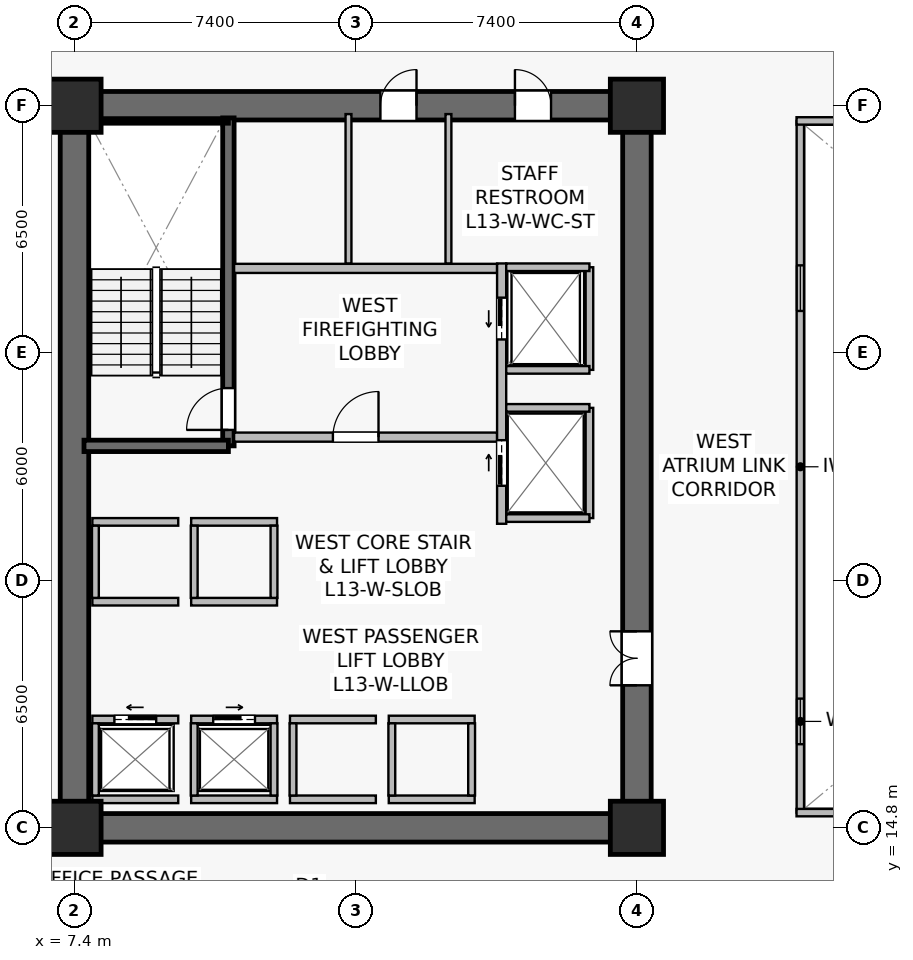
"""IFC4 building model, lengths in metres.
Left out: names, types, materials, properties, quantities, classifications, styles, units other than length and angle.
Written with IfcOpenShell. Run it as: python <this file> out.ifc"""

import sys

from ifc_helpers import new_model, si_unit, direction, frame, frame_2d, origin, origin_2d, place, context, subcontext, project, spatial, rectangle, extrude, source, transform, mapped, element, fill, save


model = new_model("IFC4")
c1 = context("Model", 3, precision=1e-05, world=origin(), true_north=direction((0.0, 1.0)))
c2 = subcontext(c1, "Body", "Model", "MODEL_VIEW")
j1 = project(units=[si_unit("LENGTHUNIT", "METRE"), si_unit("PLANEANGLEUNIT", "RADIAN")], contexts=[c1])
p1 = place(None, origin())
s1 = spatial("IfcSite", under=j1, at=p1, CompositionType="ELEMENT")
p2 = place(p1, origin())
s2 = spatial("IfcBuilding", under=s1, at=p2, CompositionType="ELEMENT")
p3 = place(p2, frame((0.0, 0.0, 53.9)))
s3 = spatial("IfcBuildingStorey", under=s2, at=p3, CompositionType="ELEMENT", Elevation=53.9)
p4 = place(p3, frame((7.025, 14.8, 0.0), z_axis=(0.0, 0.0, 1.0), x_axis=(1.0, 0.0, 0.0)))
e1 = element("IfcWall", 1, at=p4, inside=s3, PredefinedType="SHEAR", context=c2, shape_type="SweptSolid", body=[
    extrude(rectangle(XDim=15.55, YDim=0.75, at=frame_2d((7.775, 0.0))), origin(), (0.0, 0.0, 1.0), 3.78),
])
p5 = place(p3, frame((7.025, 33.8, 0.0), z_axis=(0.0, 0.0, 1.0), x_axis=(1.0, 0.0, 0.0)))
e2 = element("IfcWall", 2, at=p5, inside=s3, PredefinedType="SHEAR", context=c2, shape_type="SweptSolid", body=[
    extrude(rectangle(XDim=15.55, YDim=0.75, at=frame_2d((7.775, 0.0))), origin(), (0.0, 0.0, 1.0), 3.78),
])
p6 = place(p5, frame((8.425, 0.0, 0.0)))
e3 = element("IfcOpeningElement", 3, at=p6, cuts=e2, PredefinedType="OPENING", context=c2, shape_type="SweptSolid", body=[
    extrude(rectangle(XDim=0.95, YDim=2.15, at=frame_2d((0.475, 1.075))), frame((0.0, 0.385, 0.0), z_axis=(0.0, -1.0, 0.0), x_axis=(1.0, 0.0, 0.0)), (0.0, 0.0, 1.0), 0.77),
])
p7 = place(p5, frame((11.965, 0.0, 0.0)))
e4 = element("IfcOpeningElement", 4, at=p7, cuts=e2, PredefinedType="OPENING", context=c2, shape_type="SweptSolid", body=[
    extrude(rectangle(XDim=0.95, YDim=2.15, at=frame_2d((0.475, 1.075))), frame((0.0, 0.385, 0.0), z_axis=(0.0, -1.0, 0.0), x_axis=(1.0, 0.0, 0.0)), (0.0, 0.0, 1.0), 0.77),
])
p8 = place(p3, frame((7.4, 15.175, 0.0), z_axis=(0.0, 0.0, 1.0), x_axis=(0.0, 1.0, 0.0)))
e5 = element("IfcWall", 5, at=p8, inside=s3, PredefinedType="SHEAR", context=c2, shape_type="SweptSolid", body=[
    extrude(rectangle(XDim=18.25, YDim=0.75, at=frame_2d((9.125, 0.0))), origin(), (0.0, 0.0, 1.0), 3.78),
])
p9 = place(p3, frame((22.2, 15.175, 0.0), z_axis=(0.0, 0.0, 1.0), x_axis=(0.0, 1.0, 0.0)))
e6 = element("IfcWall", 6, at=p9, inside=s3, PredefinedType="SHEAR", context=c2, shape_type="SweptSolid", body=[
    extrude(rectangle(XDim=18.25, YDim=0.75, at=frame_2d((9.125, 0.0))), origin(), (0.0, 0.0, 1.0), 3.78),
])
p10 = place(p9, frame((3.375, 0.0, 0.0)))
e7 = element("IfcOpeningElement", 7, at=p10, cuts=e6, PredefinedType="OPENING", context=c2, shape_type="SweptSolid", body=[
    extrude(rectangle(XDim=1.42, YDim=2.2, at=frame_2d((0.71, 1.1))), frame((0.0, 0.385, 0.0), z_axis=(0.0, -1.0, 0.0), x_axis=(1.0, 0.0, 0.0)), (0.0, 0.0, 1.0), 0.77),
])
p11 = place(p3, frame((11.45, 24.85, 0.0), z_axis=(0.0, 0.0, 1.0), x_axis=(0.0, 1.0, 0.0)))
e8 = element("IfcWall", 8, at=p11, inside=s3, PredefinedType="SHEAR", context=c2, shape_type="SweptSolid", body=[
    extrude(rectangle(XDim=8.63, YDim=0.3, at=frame_2d((4.315, 0.0))), origin(), (0.0, 0.0, 1.0), 3.78),
])
p12 = place(p11, frame((0.42, 0.0, 0.0)))
e9 = element("IfcOpeningElement", 9, at=p12, cuts=e8, PredefinedType="OPENING", context=c2, shape_type="SweptSolid", body=[
    extrude(rectangle(XDim=1.1, YDim=2.15, at=frame_2d((0.55, 1.075))), frame((0.0, 0.16, 0.0), z_axis=(0.0, -1.0, 0.0), x_axis=(1.0, 0.0, 0.0)), (0.0, 0.0, 1.0), 0.32),
])
p13 = place(p3, frame((7.65, 24.85, 0.0), z_axis=(0.0, 0.0, 1.0), x_axis=(1.0, 0.0, 0.0)))
e10 = element("IfcWall", 10, at=p13, inside=s3, PredefinedType="SHEAR", context=c2, shape_type="SweptSolid", body=[
    extrude(rectangle(XDim=3.8, YDim=0.3, at=frame_2d((1.9, 0.0))), origin(), (0.0, 0.0, 1.0), 3.78),
])
p14 = place(p3, frame((7.73, 33.4, 0.0), z_axis=(0.0, 0.0, 1.0), x_axis=(1.0, 0.0, 0.0)))
e11 = element("IfcWall", 11, at=p14, inside=s3, PredefinedType="SOLIDWALL", context=c2, shape_type="SweptSolid", body=[
    extrude(rectangle(XDim=3.72, YDim=0.12, at=frame_2d((1.86, 0.0))), origin(), (0.0, 0.0, 1.0), 3.78),
])
m1 = source(origin(), c2, "Body", "SweptSolid", [
    extrude(rectangle(XDim=1.4, YDim=1.4, at=origin_2d()), origin(), (0.0, 0.0, 1.0), 4.1),
])
for number, where, z_axis, x_axis in (
    (12, (7.4, 14.8, 0.0), (0.0, 0.0, 1.0), (1.0, 0.0, 0.0)),
    (13, (22.2, 14.8, 0.0), (0.0, 0.0, 1.0), (1.0, 0.0, 0.0)),
    (14, (7.4, 33.8, 0.0), (0.0, 0.0, 1.0), (1.0, 0.0, 0.0)),
    (15, (22.2, 33.8, 0.0), (0.0, 0.0, 1.0), (1.0, 0.0, 0.0)),
):
    element("IfcColumn", number, at=place(p3, frame(where, z_axis=z_axis, x_axis=x_axis)), inside=s3, PredefinedType="COLUMN", context=c2, shape_type="MappedRepresentation", body=[
        mapped(m1, transform((0.0, 0.0, 0.0), scale=1.0)),
    ])
p15 = place(p3, frame((11.6, 25.08, 0.0), z_axis=(0.0, 0.0, 1.0), x_axis=(1.0, 0.0, 0.0)))
e16 = element("IfcWall", 16, at=p15, inside=s3, PredefinedType="SOLIDWALL", context=c2, shape_type="SweptSolid", body=[
    extrude(rectangle(XDim=6.92, YDim=0.24, at=frame_2d((3.46, 0.0))), origin(), (0.0, 0.0, 1.0), 3.065),
])
p16 = place(p15, frame((2.6, 0.0, 0.0)))
e17 = element("IfcOpeningElement", 17, at=p16, cuts=e16, PredefinedType="OPENING", context=c2, shape_type="SweptSolid", body=[
    extrude(rectangle(XDim=1.2, YDim=2.16, at=frame_2d((0.6, 1.08))), frame((0.0, 0.13, 0.0), z_axis=(0.0, -1.0, 0.0), x_axis=(1.0, 0.0, 0.0)), (0.0, 0.0, 1.0), 0.26),
])
p17 = place(p3, frame((11.6, 29.52, 0.0), z_axis=(0.0, 0.0, 1.0), x_axis=(1.0, 0.0, 0.0)))
e18 = element("IfcWall", 18, at=p17, inside=s3, PredefinedType="SOLIDWALL", context=c2, shape_type="SweptSolid", body=[
    extrude(rectangle(XDim=6.92, YDim=0.24, at=frame_2d((3.46, 0.0))), origin(), (0.0, 0.0, 1.0), 3.065),
])
p18 = place(p3, frame((18.64, 22.8, 0.0), z_axis=(0.0, 0.0, 1.0), x_axis=(0.0, 1.0, 0.0)))
e19 = element("IfcWall", 19, at=p18, inside=s3, PredefinedType="SOLIDWALL", context=c2, shape_type="SweptSolid", body=[
    extrude(rectangle(XDim=6.85, YDim=0.24, at=frame_2d((3.425, 0.0))), origin(), (0.0, 0.0, 1.0), 2.865),
])
p19 = place(p18, frame((4.85, 0.0, 0.0)))
e20 = element("IfcOpeningElement", 20, at=p19, cuts=e19, PredefinedType="OPENING", context=c2, shape_type="SweptSolid", body=[
    extrude(rectangle(XDim=1.1, YDim=2.22, at=frame_2d((0.55, 1.11))), frame((0.0, 0.13, 0.0), z_axis=(0.0, -1.0, 0.0), x_axis=(1.0, 0.0, 0.0)), (0.0, 0.0, 1.0), 0.26),
])
p20 = place(p18, frame((1.0, 0.0, 0.0)))
e21 = element("IfcOpeningElement", 21, at=p20, cuts=e19, PredefinedType="OPENING", context=c2, shape_type="SweptSolid", body=[
    extrude(rectangle(XDim=1.2, YDim=2.22, at=frame_2d((0.6, 1.11))), frame((0.0, 0.13, 0.0), z_axis=(0.0, -1.0, 0.0), x_axis=(1.0, 0.0, 0.0)), (0.0, 0.0, 1.0), 0.26),
])
p21 = place(p3, frame((7.87, 17.65, 0.0), z_axis=(0.0, 0.0, 1.0), x_axis=(1.0, 0.0, 0.0)))
e22 = element("IfcWall", 22, at=p21, inside=s3, PredefinedType="SOLIDWALL", context=c2, shape_type="SweptSolid", body=[
    extrude(rectangle(XDim=2.26, YDim=0.2, at=frame_2d((1.13, 0.0))), origin(), (0.0, 0.0, 1.0), 3.78),
])
p22 = place(p21, frame((0.58, 0.0, 0.0)))
e23 = element("IfcOpeningElement", 23, at=p22, cuts=e22, PredefinedType="OPENING", context=c2, shape_type="SweptSolid", body=[
    extrude(rectangle(XDim=1.1, YDim=2.22, at=frame_2d((0.55, 1.11))), frame((0.0, 0.11, 0.0), z_axis=(0.0, -1.0, 0.0), x_axis=(1.0, 0.0, 0.0)), (0.0, 0.0, 1.0), 0.22),
])
p23 = place(p3, frame((7.87, 15.55, 0.0), z_axis=(0.0, 0.0, 1.0), x_axis=(1.0, 0.0, 0.0)))
e24 = element("IfcWall", 24, at=p23, inside=s3, PredefinedType="SOLIDWALL", context=c2, shape_type="SweptSolid", body=[
    extrude(rectangle(XDim=2.26, YDim=0.2, at=frame_2d((1.13, 0.0))), origin(), (0.0, 0.0, 1.0), 3.78),
])
p24 = place(p3, frame((7.95, 15.65, 0.0), z_axis=(0.0, 0.0, 1.0), x_axis=(0.0, 1.0, 0.0)))
e25 = element("IfcWall", 25, at=p24, inside=s3, PredefinedType="SOLIDWALL", context=c2, shape_type="SweptSolid", body=[
    extrude(rectangle(XDim=1.9, YDim=0.18, at=frame_2d((0.95, 0.0))), origin(), (0.0, 0.0, 1.0), 3.78),
])
p25 = place(p3, frame((10.47, 17.65, 0.0), z_axis=(0.0, 0.0, 1.0), x_axis=(1.0, 0.0, 0.0)))
e26 = element("IfcWall", 26, at=p25, inside=s3, PredefinedType="SOLIDWALL", context=c2, shape_type="SweptSolid", body=[
    extrude(rectangle(XDim=2.26, YDim=0.2, at=frame_2d((1.13, 0.0))), origin(), (0.0, 0.0, 1.0), 3.78),
])
p26 = place(p25, frame((0.58, 0.0, 0.0)))
e27 = element("IfcOpeningElement", 27, at=p26, cuts=e26, PredefinedType="OPENING", context=c2, shape_type="SweptSolid", body=[
    extrude(rectangle(XDim=1.1, YDim=2.22, at=frame_2d((0.55, 1.11))), frame((0.0, 0.11, 0.0), z_axis=(0.0, -1.0, 0.0), x_axis=(1.0, 0.0, 0.0)), (0.0, 0.0, 1.0), 0.22),
])
p27 = place(p3, frame((10.47, 15.55, 0.0), z_axis=(0.0, 0.0, 1.0), x_axis=(1.0, 0.0, 0.0)))
e28 = element("IfcWall", 28, at=p27, inside=s3, PredefinedType="SOLIDWALL", context=c2, shape_type="SweptSolid", body=[
    extrude(rectangle(XDim=2.26, YDim=0.2, at=frame_2d((1.13, 0.0))), origin(), (0.0, 0.0, 1.0), 3.78),
])
for number, where, z_axis, x_axis in (
    (29, (10.55, 15.65, 0.0), (0.0, 0.0, 1.0), (0.0, 1.0, 0.0)),
    (30, (12.65, 15.65, 0.0), (0.0, 0.0, 1.0), (0.0, 1.0, 0.0)),
):
    element("IfcWall", number, at=place(p3, frame(where, z_axis=z_axis, x_axis=x_axis)), inside=s3, PredefinedType="SOLIDWALL", context=c2, shape_type="SweptSolid", body=[
        extrude(rectangle(XDim=1.9, YDim=0.18, at=frame_2d((0.95, 0.0))), origin(), (0.0, 0.0, 1.0), 3.78),
    ])
for number, where, z_axis, x_axis in (
    (31, (13.07, 17.65, 0.0), (0.0, 0.0, 1.0), (1.0, 0.0, 0.0)),
    (32, (13.07, 15.55, 0.0), (0.0, 0.0, 1.0), (1.0, 0.0, 0.0)),
):
    element("IfcWall", number, at=place(p3, frame(where, z_axis=z_axis, x_axis=x_axis)), inside=s3, PredefinedType="SOLIDWALL", context=c2, shape_type="SweptSolid", body=[
        extrude(rectangle(XDim=2.26, YDim=0.2, at=frame_2d((1.13, 0.0))), origin(), (0.0, 0.0, 1.0), 3.065),
    ])
p28 = place(p3, frame((13.15, 15.65, 0.0), z_axis=(0.0, 0.0, 1.0), x_axis=(0.0, 1.0, 0.0)))
e33 = element("IfcWall", 33, at=p28, inside=s3, PredefinedType="SOLIDWALL", context=c2, shape_type="SweptSolid", body=[
    extrude(rectangle(XDim=1.9, YDim=0.18, at=frame_2d((0.95, 0.0))), origin(), (0.0, 0.0, 1.0), 3.78),
])
for number, where, z_axis, x_axis in (
    (34, (15.67, 17.65, 0.0), (0.0, 0.0, 1.0), (1.0, 0.0, 0.0)),
    (35, (15.67, 15.55, 0.0), (0.0, 0.0, 1.0), (1.0, 0.0, 0.0)),
):
    element("IfcWall", number, at=place(p3, frame(where, z_axis=z_axis, x_axis=x_axis)), inside=s3, PredefinedType="SOLIDWALL", context=c2, shape_type="SweptSolid", body=[
        extrude(rectangle(XDim=2.26, YDim=0.2, at=frame_2d((1.13, 0.0))), origin(), (0.0, 0.0, 1.0), 3.78),
    ])
for number, where, z_axis, x_axis in (
    (36, (15.75, 15.65, 0.0), (0.0, 0.0, 1.0), (0.0, 1.0, 0.0)),
    (37, (17.85, 15.65, 0.0), (0.0, 0.0, 1.0), (0.0, 1.0, 0.0)),
):
    element("IfcWall", number, at=place(p3, frame(where, z_axis=z_axis, x_axis=x_axis)), inside=s3, PredefinedType="SOLIDWALL", context=c2, shape_type="SweptSolid", body=[
        extrude(rectangle(XDim=1.9, YDim=0.18, at=frame_2d((0.95, 0.0))), origin(), (0.0, 0.0, 1.0), 3.78),
    ])
for number, where, z_axis, x_axis in (
    (38, (7.87, 20.75, 0.0), (0.0, 0.0, 1.0), (1.0, 0.0, 0.0)),
    (39, (7.87, 22.85, 0.0), (0.0, 0.0, 1.0), (1.0, 0.0, 0.0)),
):
    element("IfcWall", number, at=place(p3, frame(where, z_axis=z_axis, x_axis=x_axis)), inside=s3, PredefinedType="SOLIDWALL", context=c2, shape_type="SweptSolid", body=[
        extrude(rectangle(XDim=2.26, YDim=0.2, at=frame_2d((1.13, 0.0))), origin(), (0.0, 0.0, 1.0), 3.78),
    ])
p29 = place(p3, frame((7.95, 20.85, 0.0), z_axis=(0.0, 0.0, 1.0), x_axis=(0.0, 1.0, 0.0)))
e40 = element("IfcWall", 40, at=p29, inside=s3, PredefinedType="SOLIDWALL", context=c2, shape_type="SweptSolid", body=[
    extrude(rectangle(XDim=1.9, YDim=0.18, at=frame_2d((0.95, 0.0))), origin(), (0.0, 0.0, 1.0), 3.78),
])
for number, where, z_axis, x_axis in (
    (41, (10.47, 20.75, 0.0), (0.0, 0.0, 1.0), (1.0, 0.0, 0.0)),
    (42, (10.47, 22.85, 0.0), (0.0, 0.0, 1.0), (1.0, 0.0, 0.0)),
):
    element("IfcWall", number, at=place(p3, frame(where, z_axis=z_axis, x_axis=x_axis)), inside=s3, PredefinedType="SOLIDWALL", context=c2, shape_type="SweptSolid", body=[
        extrude(rectangle(XDim=2.26, YDim=0.2, at=frame_2d((1.13, 0.0))), origin(), (0.0, 0.0, 1.0), 3.78),
    ])
for number, where, z_axis, x_axis in (
    (43, (10.55, 20.85, 0.0), (0.0, 0.0, 1.0), (0.0, 1.0, 0.0)),
    (44, (12.65, 20.85, 0.0), (0.0, 0.0, 1.0), (0.0, 1.0, 0.0)),
):
    element("IfcWall", number, at=place(p3, frame(where, z_axis=z_axis, x_axis=x_axis)), inside=s3, PredefinedType="SOLIDWALL", context=c2, shape_type="SweptSolid", body=[
        extrude(rectangle(XDim=1.9, YDim=0.18, at=frame_2d((0.95, 0.0))), origin(), (0.0, 0.0, 1.0), 3.78),
    ])
p30 = place(p3, frame((20.95, 26.85, 0.0), z_axis=(0.0, 0.0, 1.0), x_axis=(0.0, 1.0, 0.0)))
e45 = element("IfcWall", 45, at=p30, inside=s3, PredefinedType="SOLIDWALL", context=c2, shape_type="SweptSolid", body=[
    extrude(rectangle(XDim=2.7, YDim=0.2, at=frame_2d((1.35, 0.0))), origin(), (0.0, 0.0, 1.0), 3.78),
])
p31 = place(p3, frame((18.76, 29.55, 0.0), z_axis=(0.0, 0.0, 1.0), x_axis=(1.0, 0.0, 0.0)))
e46 = element("IfcWall", 46, at=p31, inside=s3, PredefinedType="SOLIDWALL", context=c2, shape_type="SweptSolid", body=[
    extrude(rectangle(XDim=2.19, YDim=0.2, at=frame_2d((1.095, 0.0))), origin(), (0.0, 0.0, 1.0), 3.78),
])
p32 = place(p3, frame((18.76, 26.85, 0.0), z_axis=(0.0, 0.0, 1.0), x_axis=(1.0, 0.0, 0.0)))
e47 = element("IfcWall", 47, at=p32, inside=s3, PredefinedType="SOLIDWALL", context=c2, shape_type="SweptSolid", body=[
    extrude(rectangle(XDim=2.19, YDim=0.2, at=frame_2d((1.095, 0.0))), origin(), (0.0, 0.0, 1.0), 3.177),
])
p33 = place(p3, frame((20.95, 22.95, 0.0), z_axis=(0.0, 0.0, 1.0), x_axis=(0.0, 1.0, 0.0)))
e48 = element("IfcWall", 48, at=p33, inside=s3, PredefinedType="SOLIDWALL", context=c2, shape_type="SweptSolid", body=[
    extrude(rectangle(XDim=2.9, YDim=0.2, at=frame_2d((1.45, 0.0))), origin(), (0.0, 0.0, 1.0), 2.865),
])
for number, where, z_axis, x_axis in (
    (49, (18.76, 25.85, 0.0), (0.0, 0.0, 1.0), (1.0, 0.0, 0.0)),
    (50, (18.76, 22.95, 0.0), (0.0, 0.0, 1.0), (1.0, 0.0, 0.0)),
):
    element("IfcWall", number, at=place(p3, frame(where, z_axis=z_axis, x_axis=x_axis)), inside=s3, PredefinedType="SOLIDWALL", context=c2, shape_type="SweptSolid", body=[
        extrude(rectangle(XDim=2.19, YDim=0.2, at=frame_2d((1.095, 0.0))), origin(), (0.0, 0.0, 1.0), 3.78),
    ])
p34 = place(p3, frame((14.61, 29.65, 0.0), z_axis=(0.0, 0.0, 1.0), x_axis=(0.0, 1.0, 0.0)))
e51 = element("IfcWall", 51, at=p34, inside=s3, PredefinedType="PLUMBINGWALL", context=c2, shape_type="SweptSolid", body=[
    extrude(rectangle(XDim=3.93, YDim=0.155, at=frame_2d((1.965, 0.0))), origin(), (0.0, 0.0, 1.0), 3.065),
])
p35 = place(p3, frame((17.24, 29.65, 0.0), z_axis=(0.0, 0.0, 1.0), x_axis=(0.0, 1.0, 0.0)))
e52 = element("IfcWall", 52, at=p35, inside=s3, PredefinedType="PLUMBINGWALL", context=c2, shape_type="SweptSolid", body=[
    extrude(rectangle(XDim=3.93, YDim=0.155, at=frame_2d((1.965, 0.0))), origin(), (0.0, 0.0, 1.0), 3.78),
])
p36 = place(p3, frame((26.5, 15.2, 0.0), z_axis=(0.0, 0.0, 1.0), x_axis=(0.0, 1.0, 0.0)))
e53 = element("IfcWall", 53, at=p36, inside=s3, PredefinedType="SOLIDWALL", context=c2, shape_type="SweptSolid", body=[
    extrude(rectangle(XDim=18.2, YDim=0.195, at=frame_2d((9.1, 0.0))), origin(), (0.0, 0.0, 1.0), 3.78),
])
p37 = place(p36, frame((1.8, 0.0, 0.9)))
e54 = element("IfcOpeningElement", 54, at=p37, cuts=e53, PredefinedType="OPENING", context=c2, shape_type="SweptSolid", body=[
    extrude(rectangle(XDim=1.2, YDim=1.35, at=frame_2d((0.6, 0.675))), frame((0.0, 0.107, 0.0), z_axis=(0.0, -1.0, 0.0), x_axis=(1.0, 0.0, 0.0)), (0.0, 0.0, 1.0), 0.215),
])
p38 = place(p36, frame((13.2, 0.0, 0.9)))
e55 = element("IfcOpeningElement", 55, at=p38, cuts=e53, PredefinedType="OPENING", context=c2, shape_type="SweptSolid", body=[
    extrude(rectangle(XDim=1.2, YDim=1.35, at=frame_2d((0.6, 0.675))), frame((0.0, 0.107, 0.0), z_axis=(0.0, -1.0, 0.0), x_axis=(1.0, 0.0, 0.0)), (0.0, 0.0, 1.0), 0.215),
])
for number, where, z_axis, x_axis in (
    (56, (26.4, 15.2, 0.0), (0.0, 0.0, 1.0), (1.0, 0.0, 0.0)),
    (57, (26.4, 33.4, 0.0), (0.0, 0.0, 1.0), (1.0, 0.0, 0.0)),
):
    element("IfcWall", number, at=place(p3, frame(where, z_axis=z_axis, x_axis=x_axis)), inside=s3, PredefinedType="SOLIDWALL", context=c2, shape_type="SweptSolid", body=[
        extrude(rectangle(XDim=22.0, YDim=0.195, at=frame_2d((11.0, 0.0))), origin(), (0.0, 0.0, 1.0), 3.78),
    ])
m2 = source(origin(), c2, "Body", "SweptSolid", [
    extrude(rectangle(XDim=1.2, YDim=1.35, at=frame_2d((0.6, 0.675))), frame((0.0, 0.03, 0.0), z_axis=(0.0, -1.0, 0.0), x_axis=(1.0, 0.0, 0.0)), (0.0, 0.0, 1.0), 0.06),
])
p39 = place(p37, origin())
e58 = element("IfcWindow", 58, at=p39, inside=s3, PartitioningType="SINGLE_PANEL", PredefinedType="WINDOW", context=c2, shape_type="MappedRepresentation", body=[
    mapped(m2, transform((0.0, 0.0, 0.0), scale=1.0)),
])
fill(e54, e58)
p40 = place(p38, origin())
e59 = element("IfcWindow", 59, at=p40, inside=s3, PartitioningType="SINGLE_PANEL", PredefinedType="WINDOW", context=c2, shape_type="MappedRepresentation", body=[
    mapped(m2, transform((0.0, 0.0, 0.0), scale=1.0)),
])
fill(e55, e59)
m3 = source(origin(), c2, "Body", "SweptSolid", [
    extrude(rectangle(XDim=1.1, YDim=2.15, at=frame_2d((0.55, 1.075))), frame((0.0, 0.025, 0.0), z_axis=(0.0, -1.0, 0.0), x_axis=(1.0, 0.0, 0.0)), (0.0, 0.0, 1.0), 0.05),
])
p41 = place(p12, origin())
e60 = element("IfcDoor", 60, at=p41, inside=s3, OperationType="SINGLE_SWING_LEFT", PredefinedType="DOOR", context=c2, shape_type="MappedRepresentation", body=[
    mapped(m3, transform((0.0, 0.0, 0.0), scale=1.0)),
])
fill(e9, e60)
m4 = source(origin(), c2, "Body", "SweptSolid", [
    extrude(rectangle(XDim=1.2, YDim=2.16, at=frame_2d((0.6, 1.08))), frame((0.0, 0.025, 0.0), z_axis=(0.0, -1.0, 0.0), x_axis=(1.0, 0.0, 0.0)), (0.0, 0.0, 1.0), 0.05),
])
p42 = place(p16, origin())
e61 = element("IfcDoor", 61, at=p42, inside=s3, OperationType="SINGLE_SWING_RIGHT", PredefinedType="DOOR", context=c2, shape_type="MappedRepresentation", body=[
    mapped(m4, transform((0.0, 0.0, 0.0), scale=1.0)),
])
fill(e17, e61)
m5 = source(origin(), c2, "Body", "SweptSolid", [
    extrude(rectangle(XDim=1.1, YDim=2.22, at=frame_2d((0.55, 1.11))), frame((0.0, 0.025, 0.0), z_axis=(0.0, -1.0, 0.0), x_axis=(1.0, 0.0, 0.0)), (0.0, 0.0, 1.0), 0.05),
])
p43 = place(p22, origin())
e62 = element("IfcDoor", 62, at=p43, inside=s3, OperationType="SLIDING_TO_LEFT", PredefinedType="USERDEFINED", context=c2, shape_type="MappedRepresentation", body=[
    mapped(m5, transform((0.0, 0.0, 0.0), scale=1.0)),
])
fill(e23, e62)
p44 = place(p26, origin())
e63 = element("IfcDoor", 63, at=p44, inside=s3, OperationType="SLIDING_TO_RIGHT", PredefinedType="USERDEFINED", context=c2, shape_type="MappedRepresentation", body=[
    mapped(m5, transform((0.0, 0.0, 0.0), scale=1.0)),
])
fill(e27, e63)
p45 = place(p19, origin())
e64 = element("IfcDoor", 64, at=p45, inside=s3, OperationType="SLIDING_TO_LEFT", PredefinedType="USERDEFINED", context=c2, shape_type="MappedRepresentation", body=[
    mapped(m5, transform((0.0, 0.0, 0.0), scale=1.0)),
])
fill(e20, e64)
m6 = source(origin(), c2, "Body", "SweptSolid", [
    extrude(rectangle(XDim=1.2, YDim=2.22, at=frame_2d((0.6, 1.11))), frame((0.0, 0.025, 0.0), z_axis=(0.0, -1.0, 0.0), x_axis=(1.0, 0.0, 0.0)), (0.0, 0.0, 1.0), 0.05),
])
p46 = place(p20, origin())
e65 = element("IfcDoor", 65, at=p46, inside=s3, OperationType="SLIDING_TO_RIGHT", PredefinedType="USERDEFINED", context=c2, shape_type="MappedRepresentation", body=[
    mapped(m6, transform((0.0, 0.0, 0.0), scale=1.0)),
])
fill(e21, e65)
m7 = source(origin(), c2, "Body", "SweptSolid", [
    extrude(rectangle(XDim=1.42, YDim=2.2, at=frame_2d((0.71, 1.1))), frame((0.0, 0.025, 0.0), z_axis=(0.0, -1.0, 0.0), x_axis=(1.0, 0.0, 0.0)), (0.0, 0.0, 1.0), 0.05),
])
p47 = place(p10, origin())
e66 = element("IfcDoor", 66, at=p47, inside=s3, OperationType="DOUBLE_DOOR_SINGLE_SWING", PredefinedType="DOOR", context=c2, shape_type="MappedRepresentation", body=[
    mapped(m7, transform((0.0, 0.0, 0.0), scale=1.0)),
])
fill(e7, e66)
m8 = source(origin(), c2, "Body", "SweptSolid", [
    extrude(rectangle(XDim=0.95, YDim=2.15, at=frame_2d((0.475, 1.075))), frame((0.0, 0.025, 0.0), z_axis=(0.0, -1.0, 0.0), x_axis=(1.0, 0.0, 0.0)), (0.0, 0.0, 1.0), 0.05),
])
p48 = place(p6, origin())
e67 = element("IfcDoor", 67, at=p48, inside=s3, OperationType="SINGLE_SWING_RIGHT", PredefinedType="DOOR", context=c2, shape_type="MappedRepresentation", body=[
    mapped(m8, transform((0.0, 0.0, 0.0), scale=1.0)),
])
fill(e3, e67)
p49 = place(p7, origin())
e68 = element("IfcDoor", 68, at=p49, inside=s3, OperationType="SINGLE_SWING_LEFT", PredefinedType="DOOR", context=c2, shape_type="MappedRepresentation", body=[
    mapped(m8, transform((0.0, 0.0, 0.0), scale=1.0)),
])
fill(e4, e68)
save(model, sys.argv[1])
